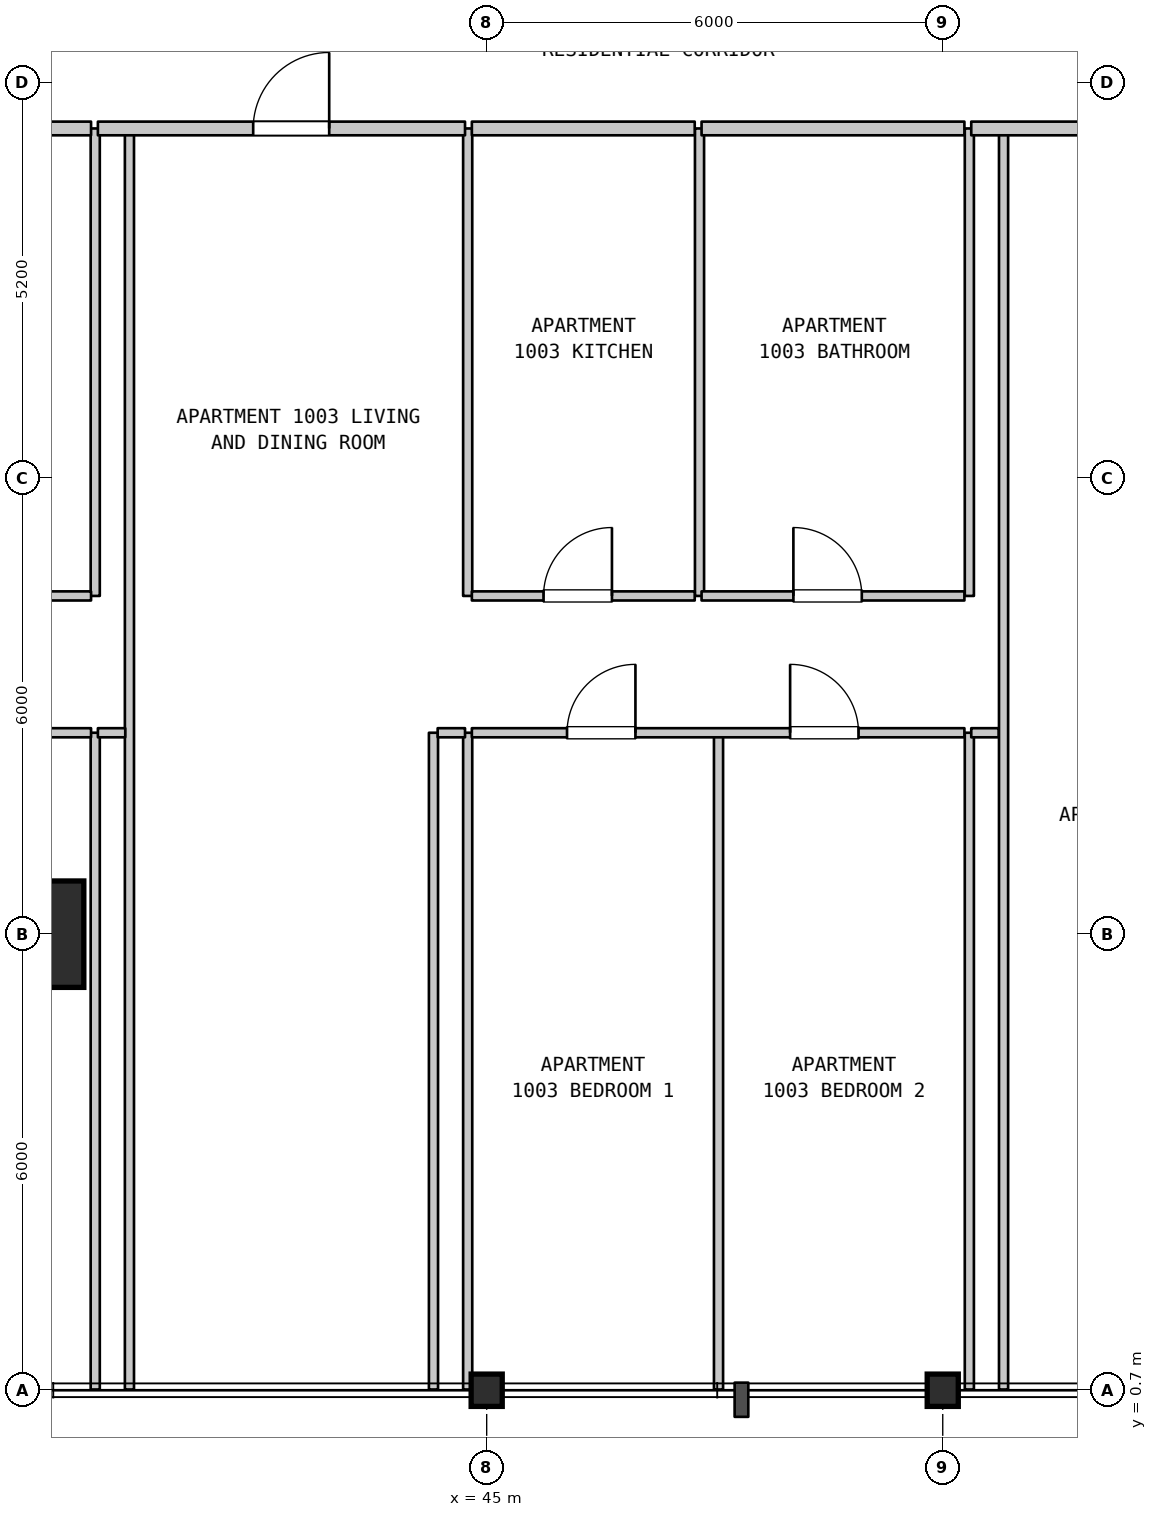
"""IFC4 building model, lengths in metres.
Left out: names, types, materials, properties, quantities, classifications, styles, units other than length and angle.
Written with IfcOpenShell. Run it as: python <this file> out.ifc"""

import sys

from ifc_helpers import new_model, si_unit, direction, frame, frame_2d, origin, origin_2d, place, context, subcontext, project, spatial, rectangle, i_section, extrude, element, fill, save


model = new_model("IFC4")
c1 = context("Model", 3, precision=1e-05, world=origin(), true_north=direction((0.0, 1.0)))
c2 = subcontext(c1, "Body", "Model", "MODEL_VIEW")
j1 = project(units=[si_unit("LENGTHUNIT", "METRE"), si_unit("PLANEANGLEUNIT", "RADIAN")], contexts=[c1])
p1 = place(None, origin())
s1 = spatial("IfcSite", under=j1, at=p1, CompositionType="ELEMENT")
p2 = place(p1, origin())
s2 = spatial("IfcBuilding", under=s1, at=p2, CompositionType="ELEMENT")
p3 = place(p2, frame((0.0, 0.0, 46.2)))
s3 = spatial("IfcBuildingStorey", under=s2, at=p3, CompositionType="ELEMENT", Elevation=46.2)
p4 = place(p3, frame((39.0, 6.7, 0.0), z_axis=(0.0, 0.0, 1.0), x_axis=(1.0, 0.0, 0.0)))
e1 = element("IfcColumn", 1, at=p4, inside=s3, PredefinedType="COLUMN", context=c2, shape_type="SweptSolid", body=[
    extrude(rectangle(XDim=1.4, YDim=1.4, at=origin_2d()), origin(), (0.0, 0.0, 1.0), 3.7),
])
for number, where, z_axis, x_axis in (
    (2, (45.0, 0.7, 0.0), (0.0, 0.0, 1.0), (1.0, 0.0, 0.0)),
    (3, (51.0, 0.7, 0.0), (0.0, 0.0, 1.0), (1.0, 0.0, 0.0)),
):
    element("IfcColumn", number, at=place(p3, frame(where, z_axis=z_axis, x_axis=x_axis)), inside=s3, PredefinedType="COLUMN", context=c2, shape_type="SweptSolid", body=[
        extrude(i_section(OverallWidth=0.409, OverallDepth=0.425, WebThickness=0.032, FlangeThickness=0.052, FilletRadius=0.015, at=origin_2d()), origin(), (0.0, 0.0, 1.0), 3.7),
    ])
p5 = place(p3, frame((39.85, 0.71, 0.0), z_axis=(0.0, 0.0, 1.0), x_axis=(0.0, 1.0, 0.0)))
e4 = element("IfcWall", 4, at=p5, inside=s3, PredefinedType="PARTITIONING", context=c2, shape_type="SweptSolid", body=[
    extrude(rectangle(XDim=8.64, YDim=0.12, at=frame_2d((4.32, 0.0))), origin(), (0.0, 0.0, 1.0), 3.385),
])
p6 = place(p3, frame((39.85, 11.15, 0.0), z_axis=(0.0, 0.0, 1.0), x_axis=(0.0, 1.0, 0.0)))
e5 = element("IfcWall", 5, at=p6, inside=s3, PredefinedType="PARTITIONING", context=c2, shape_type="SweptSolid", body=[
    extrude(rectangle(XDim=6.15, YDim=0.12, at=frame_2d((3.075, 0.0))), origin(), (0.0, 0.0, 1.0), 3.385),
])
p7 = place(p3, frame((40.3, 0.71, 0.0), z_axis=(0.0, 0.0, 1.0), x_axis=(0.0, 1.0, 0.0)))
e6 = element("IfcWall", 6, at=p7, inside=s3, PredefinedType="PARTITIONING", context=c2, shape_type="SweptSolid", body=[
    extrude(rectangle(XDim=16.59, YDim=0.12, at=frame_2d((8.295, 0.0))), origin(), (0.0, 0.0, 1.0), 3.385),
])
for number, where, z_axis, x_axis in (
    (7, (44.3, 0.71, 0.0), (0.0, 0.0, 1.0), (0.0, 1.0, 0.0)),
    (8, (44.75, 0.71, 0.0), (0.0, 0.0, 1.0), (0.0, 1.0, 0.0)),
):
    element("IfcWall", number, at=place(p3, frame(where, z_axis=z_axis, x_axis=x_axis)), inside=s3, PredefinedType="PARTITIONING", context=c2, shape_type="SweptSolid", body=[
        extrude(rectangle(XDim=8.64, YDim=0.12, at=frame_2d((4.32, 0.0))), origin(), (0.0, 0.0, 1.0), 3.385),
    ])
for number, where, z_axis, x_axis in (
    (9, (44.75, 11.15, 0.0), (0.0, 0.0, 1.0), (0.0, 1.0, 0.0)),
    (10, (47.8, 11.15, 0.0), (0.0, 0.0, 1.0), (0.0, 1.0, 0.0)),
):
    element("IfcWall", number, at=place(p3, frame(where, z_axis=z_axis, x_axis=x_axis)), inside=s3, PredefinedType="PARTITIONING", context=c2, shape_type="SweptSolid", body=[
        extrude(rectangle(XDim=6.15, YDim=0.12, at=frame_2d((3.075, 0.0))), origin(), (0.0, 0.0, 1.0), 3.385),
    ])
for number, where, z_axis, x_axis in (
    (11, (48.05, 0.71, 0.0), (0.0, 0.0, 1.0), (0.0, 1.0, 0.0)),
    (12, (51.35, 0.71, 0.0), (0.0, 0.0, 1.0), (0.0, 1.0, 0.0)),
):
    element("IfcWall", number, at=place(p3, frame(where, z_axis=z_axis, x_axis=x_axis)), inside=s3, PredefinedType="PARTITIONING", context=c2, shape_type="SweptSolid", body=[
        extrude(rectangle(XDim=8.64, YDim=0.12, at=frame_2d((4.32, 0.0))), origin(), (0.0, 0.0, 1.0), 3.385),
    ])
p8 = place(p3, frame((51.35, 11.15, 0.0), z_axis=(0.0, 0.0, 1.0), x_axis=(0.0, 1.0, 0.0)))
e13 = element("IfcWall", 13, at=p8, inside=s3, PredefinedType="PARTITIONING", context=c2, shape_type="SweptSolid", body=[
    extrude(rectangle(XDim=6.15, YDim=0.12, at=frame_2d((3.075, 0.0))), origin(), (0.0, 0.0, 1.0), 3.385),
])
p9 = place(p3, frame((51.8, 0.71, 0.0), z_axis=(0.0, 0.0, 1.0), x_axis=(0.0, 1.0, 0.0)))
e14 = element("IfcWall", 14, at=p9, inside=s3, PredefinedType="PARTITIONING", context=c2, shape_type="SweptSolid", body=[
    extrude(rectangle(XDim=16.59, YDim=0.12, at=frame_2d((8.295, 0.0))), origin(), (0.0, 0.0, 1.0), 3.385),
])
p10 = place(p3, frame((33.315, 9.35, 0.0), z_axis=(0.0, 0.0, 1.0), x_axis=(1.0, 0.0, 0.0)))
e15 = element("IfcWall", 15, at=p10, inside=s3, PredefinedType="PARTITIONING", context=c2, shape_type="SweptSolid", body=[
    extrude(rectangle(XDim=6.48, YDim=0.12, at=frame_2d((3.24, 0.0))), origin(), (0.0, 0.0, 1.0), 3.385),
])
p11 = place(p10, frame((1.252, 0.0, 0.0)))
e16 = element("IfcOpeningElement", 16, at=p11, cuts=e15, PredefinedType="OPENING", context=c2, shape_type="SweptSolid", body=[
    extrude(rectangle(XDim=0.9, YDim=2.15, at=frame_2d((0.45, 1.075))), frame((0.0, 0.07, 0.0), z_axis=(0.0, -1.0, 0.0), x_axis=(1.0, 0.0, 0.0)), (0.0, 0.0, 1.0), 0.14),
])
p12 = place(p10, frame((4.187, 0.0, 0.0)))
e17 = element("IfcOpeningElement", 17, at=p12, cuts=e15, PredefinedType="OPENING", context=c2, shape_type="SweptSolid", body=[
    extrude(rectangle(XDim=0.9, YDim=2.15, at=frame_2d((0.45, 1.075))), frame((0.0, 0.07, 0.0), z_axis=(0.0, -1.0, 0.0), x_axis=(1.0, 0.0, 0.0)), (0.0, 0.0, 1.0), 0.14),
])
for number, where, z_axis, x_axis in (
    (18, (39.885, 9.35, 0.0), (0.0, 0.0, 1.0), (1.0, 0.0, 0.0)),
    (19, (44.355, 9.35, 0.0), (0.0, 0.0, 1.0), (1.0, 0.0, 0.0)),
):
    element("IfcWall", number, at=place(p3, frame(where, z_axis=z_axis, x_axis=x_axis)), inside=s3, PredefinedType="PARTITIONING", context=c2, shape_type="SweptSolid", body=[
        extrude(rectangle(XDim=0.36, YDim=0.12, at=frame_2d((0.18, 0.0))), origin(), (0.0, 0.0, 1.0), 3.385),
    ])
p13 = place(p3, frame((44.805, 9.35, 0.0), z_axis=(0.0, 0.0, 1.0), x_axis=(1.0, 0.0, 0.0)))
e20 = element("IfcWall", 20, at=p13, inside=s3, PredefinedType="PARTITIONING", context=c2, shape_type="SweptSolid", body=[
    extrude(rectangle(XDim=6.48, YDim=0.12, at=frame_2d((3.24, 0.0))), origin(), (0.0, 0.0, 1.0), 3.385),
])
p14 = place(p13, frame((1.252, 0.0, 0.0)))
e21 = element("IfcOpeningElement", 21, at=p14, cuts=e20, PredefinedType="OPENING", context=c2, shape_type="SweptSolid", body=[
    extrude(rectangle(XDim=0.9, YDim=2.15, at=frame_2d((0.45, 1.075))), frame((0.0, 0.07, 0.0), z_axis=(0.0, -1.0, 0.0), x_axis=(1.0, 0.0, 0.0)), (0.0, 0.0, 1.0), 0.14),
])
p15 = place(p13, frame((4.187, 0.0, 0.0)))
e22 = element("IfcOpeningElement", 22, at=p15, cuts=e20, PredefinedType="OPENING", context=c2, shape_type="SweptSolid", body=[
    extrude(rectangle(XDim=0.9, YDim=2.15, at=frame_2d((0.45, 1.075))), frame((0.0, 0.07, 0.0), z_axis=(0.0, -1.0, 0.0), x_axis=(1.0, 0.0, 0.0)), (0.0, 0.0, 1.0), 0.14),
])
p16 = place(p3, frame((51.375, 9.35, 0.0), z_axis=(0.0, 0.0, 1.0), x_axis=(1.0, 0.0, 0.0)))
e23 = element("IfcWall", 23, at=p16, inside=s3, PredefinedType="PARTITIONING", context=c2, shape_type="SweptSolid", body=[
    extrude(rectangle(XDim=0.36, YDim=0.12, at=frame_2d((0.18, 0.0))), origin(), (0.0, 0.0, 1.0), 3.385),
])
p17 = place(p3, frame((36.337, 11.15, 0.0), z_axis=(0.0, 0.0, 1.0), x_axis=(1.0, 0.0, 0.0)))
e24 = element("IfcWall", 24, at=p17, inside=s3, PredefinedType="PARTITIONING", context=c2, shape_type="SweptSolid", body=[
    extrude(rectangle(XDim=3.458, YDim=0.12, at=frame_2d((1.729, 0.0))), origin(), (0.0, 0.0, 1.0), 3.385),
])
p18 = place(p17, frame((1.208, 0.0, 0.0)))
e25 = element("IfcOpeningElement", 25, at=p18, cuts=e24, PredefinedType="OPENING", context=c2, shape_type="SweptSolid", body=[
    extrude(rectangle(XDim=0.9, YDim=2.1, at=frame_2d((0.45, 1.05))), frame((0.0, 0.07, 0.0), z_axis=(0.0, -1.0, 0.0), x_axis=(1.0, 0.0, 0.0)), (0.0, 0.0, 1.0), 0.14),
])
p19 = place(p3, frame((44.805, 11.15, 0.0), z_axis=(0.0, 0.0, 1.0), x_axis=(1.0, 0.0, 0.0)))
e26 = element("IfcWall", 26, at=p19, inside=s3, PredefinedType="PARTITIONING", context=c2, shape_type="SweptSolid", body=[
    extrude(rectangle(XDim=2.932, YDim=0.12, at=frame_2d((1.466, 0.0))), origin(), (0.0, 0.0, 1.0), 3.385),
])
p20 = place(p19, frame((0.943, 0.0, 0.0)))
e27 = element("IfcOpeningElement", 27, at=p20, cuts=e26, PredefinedType="OPENING", context=c2, shape_type="SweptSolid", body=[
    extrude(rectangle(XDim=0.9, YDim=2.15, at=frame_2d((0.45, 1.075))), frame((0.0, 0.07, 0.0), z_axis=(0.0, -1.0, 0.0), x_axis=(1.0, 0.0, 0.0)), (0.0, 0.0, 1.0), 0.14),
])
p21 = place(p3, frame((47.827, 11.15, 0.0), z_axis=(0.0, 0.0, 1.0), x_axis=(1.0, 0.0, 0.0)))
e28 = element("IfcWall", 28, at=p21, inside=s3, PredefinedType="PARTITIONING", context=c2, shape_type="SweptSolid", body=[
    extrude(rectangle(XDim=3.458, YDim=0.12, at=frame_2d((1.729, 0.0))), origin(), (0.0, 0.0, 1.0), 3.385),
])
p22 = place(p21, frame((1.208, 0.0, 0.0)))
e29 = element("IfcOpeningElement", 29, at=p22, cuts=e28, PredefinedType="OPENING", context=c2, shape_type="SweptSolid", body=[
    extrude(rectangle(XDim=0.9, YDim=2.1, at=frame_2d((0.45, 1.05))), frame((0.0, 0.07, 0.0), z_axis=(0.0, -1.0, 0.0), x_axis=(1.0, 0.0, 0.0)), (0.0, 0.0, 1.0), 0.14),
])
p23 = place(p3, frame((36.337, 17.3, 0.0), z_axis=(0.0, 0.0, 1.0), x_axis=(1.0, 0.0, 0.0)))
e30 = element("IfcWall", 30, at=p23, inside=s3, PredefinedType="STANDARD", context=c2, shape_type="SweptSolid", body=[
    extrude(rectangle(XDim=3.458, YDim=0.18, at=frame_2d((1.729, 0.0))), origin(), (0.0, 0.0, 1.0), 3.385),
])
p24 = place(p3, frame((39.885, 17.3, 0.0), z_axis=(0.0, 0.0, 1.0), x_axis=(1.0, 0.0, 0.0)))
e31 = element("IfcWall", 31, at=p24, inside=s3, PredefinedType="STANDARD", context=c2, shape_type="SweptSolid", body=[
    extrude(rectangle(XDim=4.83, YDim=0.18, at=frame_2d((2.415, 0.0))), origin(), (0.0, 0.0, 1.0), 3.385),
])
p25 = place(p24, frame((2.043, 0.0, 0.0)))
e32 = element("IfcOpeningElement", 32, at=p25, cuts=e31, PredefinedType="OPENING", context=c2, shape_type="SweptSolid", body=[
    extrude(rectangle(XDim=1.0, YDim=2.15, at=frame_2d((0.5, 1.075))), frame((0.0, 0.1, 0.0), z_axis=(0.0, -1.0, 0.0), x_axis=(1.0, 0.0, 0.0)), (0.0, 0.0, 1.0), 0.2),
])
p26 = place(p3, frame((44.805, 17.3, 0.0), z_axis=(0.0, 0.0, 1.0), x_axis=(1.0, 0.0, 0.0)))
e33 = element("IfcWall", 33, at=p26, inside=s3, PredefinedType="STANDARD", context=c2, shape_type="SweptSolid", body=[
    extrude(rectangle(XDim=2.932, YDim=0.18, at=frame_2d((1.466, 0.0))), origin(), (0.0, 0.0, 1.0), 3.385),
])
p27 = place(p3, frame((47.827, 17.3, 0.0), z_axis=(0.0, 0.0, 1.0), x_axis=(1.0, 0.0, 0.0)))
e34 = element("IfcWall", 34, at=p27, inside=s3, PredefinedType="STANDARD", context=c2, shape_type="SweptSolid", body=[
    extrude(rectangle(XDim=3.458, YDim=0.18, at=frame_2d((1.729, 0.0))), origin(), (0.0, 0.0, 1.0), 3.385),
])
p28 = place(p3, frame((51.375, 17.3, 0.0), z_axis=(0.0, 0.0, 1.0), x_axis=(1.0, 0.0, 0.0)))
e35 = element("IfcWall", 35, at=p28, inside=s3, PredefinedType="STANDARD", context=c2, shape_type="SweptSolid", body=[
    extrude(rectangle(XDim=3.96, YDim=0.18, at=frame_2d((1.98, 0.0))), origin(), (0.0, 0.0, 1.0), 3.385),
])
p29 = place(p28, frame((1.609, 0.0, 0.0)))
e36 = element("IfcOpeningElement", 36, at=p29, cuts=e35, PredefinedType="OPENING", context=c2, shape_type="SweptSolid", body=[
    extrude(rectangle(XDim=1.0, YDim=2.15, at=frame_2d((0.5, 1.075))), frame((0.0, 0.1, 0.0), z_axis=(0.0, -1.0, 0.0), x_axis=(1.0, 0.0, 0.0)), (0.0, 0.0, 1.0), 0.2),
])
p30 = place(p14, origin())
e37 = element("IfcDoor", 37, at=p30, inside=s3, OperationType="SINGLE_SWING_RIGHT", PredefinedType="DOOR", context=c2, shape_type="SweptSolid", body=[
    extrude(rectangle(XDim=0.9, YDim=2.15, at=frame_2d((0.45, 1.075))), frame((0.0, 0.025, 0.0), z_axis=(0.0, -1.0, 0.0), x_axis=(1.0, 0.0, 0.0)), (0.0, 0.0, 1.0), 0.05),
])
fill(e21, e37)
p31 = place(p15, origin())
e38 = element("IfcDoor", 38, at=p31, inside=s3, OperationType="SINGLE_SWING_LEFT", PredefinedType="DOOR", context=c2, shape_type="SweptSolid", body=[
    extrude(rectangle(XDim=0.9, YDim=2.15, at=frame_2d((0.45, 1.075))), frame((0.0, 0.025, 0.0), z_axis=(0.0, -1.0, 0.0), x_axis=(1.0, 0.0, 0.0)), (0.0, 0.0, 1.0), 0.05),
])
fill(e22, e38)
p32 = place(p20, origin())
e39 = element("IfcDoor", 39, at=p32, inside=s3, OperationType="SINGLE_SWING_RIGHT", PredefinedType="DOOR", context=c2, shape_type="SweptSolid", body=[
    extrude(rectangle(XDim=0.9, YDim=2.15, at=frame_2d((0.45, 1.075))), frame((0.0, 0.025, 0.0), z_axis=(0.0, -1.0, 0.0), x_axis=(1.0, 0.0, 0.0)), (0.0, 0.0, 1.0), 0.05),
])
fill(e27, e39)
p33 = place(p22, origin())
e40 = element("IfcDoor", 40, at=p33, inside=s3, OperationType="SINGLE_SWING_LEFT", PredefinedType="DOOR", context=c2, shape_type="SweptSolid", body=[
    extrude(rectangle(XDim=0.9, YDim=2.1, at=frame_2d((0.45, 1.05))), frame((0.0, 0.025, 0.0), z_axis=(0.0, -1.0, 0.0), x_axis=(1.0, 0.0, 0.0)), (0.0, 0.0, 1.0), 0.05),
])
fill(e29, e40)
p34 = place(p25, origin())
e41 = element("IfcDoor", 41, at=p34, inside=s3, OperationType="SINGLE_SWING_RIGHT", PredefinedType="DOOR", context=c2, shape_type="SweptSolid", body=[
    extrude(rectangle(XDim=1.0, YDim=2.15, at=frame_2d((0.5, 1.075))), frame((0.0, 0.025, 0.0), z_axis=(0.0, -1.0, 0.0), x_axis=(1.0, 0.0, 0.0)), (0.0, 0.0, 1.0), 0.05),
])
fill(e32, e41)
save(model, sys.argv[1])
